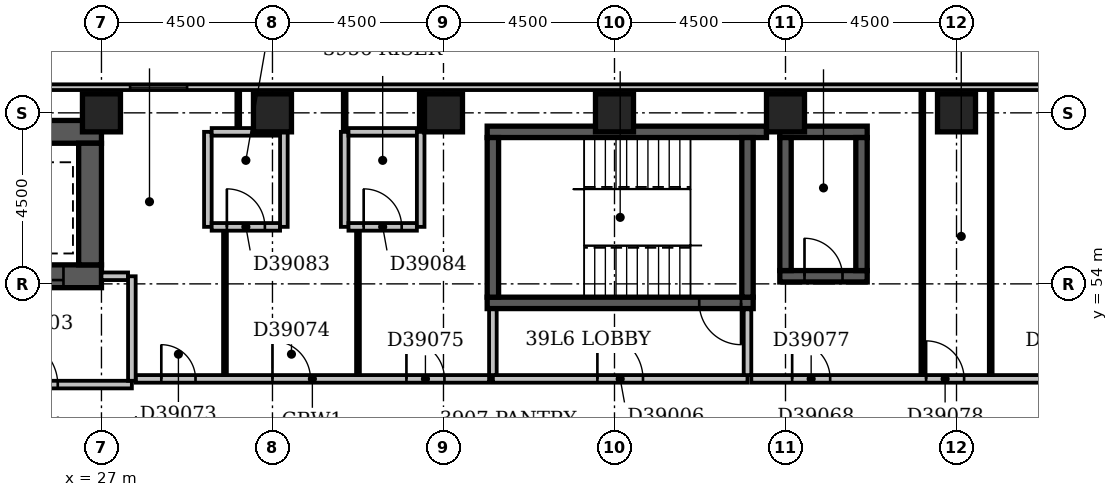
"""IFC4 building model, lengths in metres.
Left out: names, types, materials, properties, quantities, classifications, styles, units other than length and angle.
Written with IfcOpenShell. Run it as: python <this file> out.ifc"""

import sys

from ifc_helpers import new_model, si_unit, direction, frame, frame_2d, origin, origin_2d, place, context, subcontext, project, spatial, rectangle, extrude, element, fill, save


model = new_model("IFC4")
c1 = context("Model", 3, precision=1e-05, world=origin(), true_north=direction((0.0, 1.0)))
c2 = subcontext(c1, "Body", "Model", "MODEL_VIEW")
j1 = project(units=[si_unit("LENGTHUNIT", "METRE"), si_unit("PLANEANGLEUNIT", "RADIAN")], contexts=[c1])
p1 = place(None, origin())
s1 = spatial("IfcSite", under=j1, at=p1, CompositionType="ELEMENT")
p2 = place(p1, origin())
s2 = spatial("IfcBuilding", under=s1, at=p2, CompositionType="ELEMENT")
p3 = place(p2, frame((0.0, 0.0, 155.6)))
s3 = spatial("IfcBuildingStorey", under=s2, at=p3, CompositionType="ELEMENT", Elevation=155.6)
p4 = place(p3, frame((23.9, 54.2, -0.3), z_axis=(0.0, 0.0, 1.0), x_axis=(1.0, 0.0, 0.0)))
e1 = element("IfcWall", 1, at=p4, inside=s3, PredefinedType="SHEAR", context=c2, shape_type="SweptSolid", body=[
    extrude(rectangle(XDim=3.1, YDim=0.6, at=frame_2d((1.55, 0.0))), origin(), (0.0, 0.0, 1.0), 3.6),
])
p5 = place(p4, frame((1.0, 0.0, 0.3)))
e2 = element("IfcOpeningElement", 2, at=p5, cuts=e1, PredefinedType="OPENING", context=c2, shape_type="SweptSolid", body=[
    extrude(rectangle(XDim=1.1, YDim=2.1, at=frame_2d((0.55, 1.05))), frame((0.0, 0.312, 0.0), z_axis=(0.0, -1.0, 0.0), x_axis=(1.0, 0.0, 0.0)), (0.0, 0.0, 1.0), 0.624),
])
p6 = place(p3, frame((23.9, 58.0, -0.3), z_axis=(0.0, 0.0, 1.0), x_axis=(1.0, 0.0, 0.0)))
e3 = element("IfcWall", 3, at=p6, inside=s3, PredefinedType="SHEAR", context=c2, shape_type="SweptSolid", body=[
    extrude(rectangle(XDim=3.1, YDim=0.6, at=frame_2d((1.55, 0.0))), origin(), (0.0, 0.0, 1.0), 3.6),
])
p7 = place(p3, frame((26.7, 54.5, -0.3), z_axis=(0.0, 0.0, 1.0), x_axis=(0.0, 1.0, 0.0)))
e4 = element("IfcWall", 4, at=p7, inside=s3, PredefinedType="SHEAR", context=c2, shape_type="SweptSolid", body=[
    extrude(rectangle(XDim=3.2, YDim=0.6, at=frame_2d((1.6, 0.0))), origin(), (0.0, 0.0, 1.0), 3.6),
])
p8 = place(p3, frame((37.15, 53.5, -0.3), z_axis=(0.0, 0.0, 1.0), x_axis=(1.0, 0.0, 0.0)))
e5 = element("IfcWall", 5, at=p8, inside=s3, PredefinedType="SHEAR", context=c2, shape_type="SweptSolid", body=[
    extrude(rectangle(XDim=7.0, YDim=0.3, at=frame_2d((3.5, 0.0))), origin(), (0.0, 0.0, 1.0), 3.6),
])
p9 = place(p8, frame((5.58, 0.0, 0.3)))
e6 = element("IfcOpeningElement", 6, at=p9, cuts=e5, PredefinedType="OPENING", context=c2, shape_type="SweptSolid", body=[
    extrude(rectangle(XDim=1.1, YDim=2.1, at=frame_2d((0.55, 1.05))), frame((0.0, 0.162, 0.0), z_axis=(0.0, -1.0, 0.0), x_axis=(1.0, 0.0, 0.0)), (0.0, 0.0, 1.0), 0.324),
])
p10 = place(p3, frame((37.15, 58.0, -0.3), z_axis=(0.0, 0.0, 1.0), x_axis=(1.0, 0.0, 0.0)))
e7 = element("IfcWall", 7, at=p10, inside=s3, PredefinedType="SHEAR", context=c2, shape_type="SweptSolid", body=[
    extrude(rectangle(XDim=7.35, YDim=0.3, at=frame_2d((3.675, 0.0))), origin(), (0.0, 0.0, 1.0), 3.6),
])
for number, where, z_axis, x_axis in (
    (8, (37.3, 53.65, -0.3), (0.0, 0.0, 1.0), (0.0, 1.0, 0.0)),
    (9, (44.0, 53.65, -0.3), (0.0, 0.0, 1.0), (0.0, 1.0, 0.0)),
):
    element("IfcWall", number, at=place(p3, frame(where, z_axis=z_axis, x_axis=x_axis)), inside=s3, PredefinedType="SHEAR", context=c2, shape_type="SweptSolid", body=[
        extrude(rectangle(XDim=4.2, YDim=0.3, at=frame_2d((2.1, 0.0))), origin(), (0.0, 0.0, 1.0), 3.6),
    ])
p11 = place(p3, frame((44.85, 54.2, -0.3), z_axis=(0.0, 0.0, 1.0), x_axis=(1.0, 0.0, 0.0)))
e10 = element("IfcWall", 10, at=p11, inside=s3, PredefinedType="SHEAR", context=c2, shape_type="SweptSolid", body=[
    extrude(rectangle(XDim=2.3, YDim=0.3, at=frame_2d((1.15, 0.0))), origin(), (0.0, 0.0, 1.0), 3.6),
])
p12 = place(p11, frame((0.65, 0.0, 0.3)))
e11 = element("IfcOpeningElement", 11, at=p12, cuts=e10, PredefinedType="OPENING", context=c2, shape_type="SweptSolid", body=[
    extrude(rectangle(XDim=1.0, YDim=2.1, at=frame_2d((0.5, 1.05))), frame((0.0, 0.162, 0.0), z_axis=(0.0, -1.0, 0.0), x_axis=(1.0, 0.0, 0.0)), (0.0, 0.0, 1.0), 0.324),
])
p13 = place(p3, frame((44.85, 58.0, -0.3), z_axis=(0.0, 0.0, 1.0), x_axis=(1.0, 0.0, 0.0)))
e12 = element("IfcWall", 12, at=p13, inside=s3, PredefinedType="SHEAR", context=c2, shape_type="SweptSolid", body=[
    extrude(rectangle(XDim=2.3, YDim=0.3, at=frame_2d((1.15, 0.0))), origin(), (0.0, 0.0, 1.0), 3.6),
])
for number, where, z_axis, x_axis in (
    (13, (45.0, 54.35, -0.3), (0.0, 0.0, 1.0), (0.0, 1.0, 0.0)),
    (14, (47.0, 54.35, -0.3), (0.0, 0.0, 1.0), (0.0, 1.0, 0.0)),
):
    element("IfcWall", number, at=place(p3, frame(where, z_axis=z_axis, x_axis=x_axis)), inside=s3, PredefinedType="SHEAR", context=c2, shape_type="SweptSolid", body=[
        extrude(rectangle(XDim=3.5, YDim=0.3, at=frame_2d((1.75, 0.0))), origin(), (0.0, 0.0, 1.0), 3.6),
    ])
for number, where, z_axis, x_axis in (
    (15, (27.0, 58.5, -0.3), (0.0, 0.0, 1.0), (1.0, 0.0, 0.0)),
    (16, (31.5, 58.5, -0.3), (0.0, 0.0, 1.0), (1.0, 0.0, 0.0)),
    (17, (36.0, 58.5, -0.3), (0.0, 0.0, 1.0), (1.0, 0.0, 0.0)),
    (18, (40.5, 58.5, -0.3), (0.0, 0.0, 1.0), (1.0, 0.0, 0.0)),
    (19, (45.0, 58.5, -0.3), (0.0, 0.0, 1.0), (1.0, 0.0, 0.0)),
    (20, (49.5, 58.5, -0.3), (0.0, 0.0, 1.0), (1.0, 0.0, 0.0)),
):
    element("IfcColumn", number, at=place(p3, frame(where, z_axis=z_axis, x_axis=x_axis)), inside=s3, PredefinedType="COLUMN", context=c2, shape_type="SweptSolid", body=[
        extrude(rectangle(XDim=1.0, YDim=1.0, at=origin_2d()), origin(), (0.0, 0.0, 1.0), 3.6),
    ])
p14 = place(p3, frame((68.1, 59.175, 0.0), z_axis=(0.0, 0.0, 1.0), x_axis=(-1.0, 0.0, 0.0)))
e21 = element("IfcWall", 21, at=p14, inside=s3, PredefinedType="STANDARD", context=c2, shape_type="SweptSolid", body=[
    extrude(rectangle(XDim=68.85, YDim=0.15, at=frame_2d((34.425, 0.0))), origin(), (0.0, 0.0, 1.0), 2.7),
])
p15 = place(p14, frame((1.65, 0.0, 0.6)))
e22 = element("IfcOpeningElement", 22, at=p15, cuts=e21, PredefinedType="OPENING", context=c2, shape_type="SweptSolid", body=[
    extrude(rectangle(XDim=2.4, YDim=1.8, at=frame_2d((1.2, 0.9))), frame((0.0, 0.087, 0.0), z_axis=(0.0, -1.0, 0.0), x_axis=(1.0, 0.0, 0.0)), (0.0, 0.0, 1.0), 0.174),
])
p16 = place(p14, frame((6.15, 0.0, 0.6)))
e23 = element("IfcOpeningElement", 23, at=p16, cuts=e21, PredefinedType="OPENING", context=c2, shape_type="SweptSolid", body=[
    extrude(rectangle(XDim=2.4, YDim=1.8, at=frame_2d((1.2, 0.9))), frame((0.0, 0.087, 0.0), z_axis=(0.0, -1.0, 0.0), x_axis=(1.0, 0.0, 0.0)), (0.0, 0.0, 1.0), 0.174),
])
p17 = place(p14, frame((38.847, 0.0, 0.6)))
e24 = element("IfcOpeningElement", 24, at=p17, cuts=e21, PredefinedType="OPENING", context=c2, shape_type="SweptSolid", body=[
    extrude(rectangle(XDim=1.5, YDim=1.8, at=frame_2d((0.75, 0.9))), frame((0.0, 0.087, 0.0), z_axis=(0.0, -1.0, 0.0), x_axis=(1.0, 0.0, 0.0)), (0.0, 0.0, 1.0), 0.174),
])
p18 = place(p3, frame((23.0, 51.35, 0.0), z_axis=(0.0, 0.0, 1.0), x_axis=(1.0, 0.0, 0.0)))
e25 = element("IfcWall", 25, at=p18, inside=s3, PredefinedType="PARTITIONING", context=c2, shape_type="SweptSolid", body=[
    extrude(rectangle(XDim=4.8, YDim=0.2, at=frame_2d((2.4, 0.0))), origin(), (0.0, 0.0, 1.0), 3.3),
])
p19 = place(p18, frame((1.65, 0.0, 0.0)))
e26 = element("IfcOpeningElement", 26, at=p19, cuts=e25, PredefinedType="OPENING", context=c2, shape_type="SweptSolid", body=[
    extrude(rectangle(XDim=1.2, YDim=2.1, at=frame_2d((0.6, 1.05))), frame((0.0, 0.112, 0.0), z_axis=(0.0, -1.0, 0.0), x_axis=(1.0, 0.0, 0.0)), (0.0, 0.0, 1.0), 0.224),
])
p20 = place(p3, frame((27.8, 51.45, 0.0), z_axis=(0.0, 0.0, 1.0), x_axis=(0.0, 1.0, 0.0)))
e27 = element("IfcWall", 27, at=p20, inside=s3, PredefinedType="PARTITIONING", context=c2, shape_type="SweptSolid", body=[
    extrude(rectangle(XDim=2.75, YDim=0.2, at=frame_2d((1.375, 0.0))), origin(), (0.0, 0.0, 1.0), 3.3),
])
p21 = place(p3, frame((27.0, 54.2, 0.0), z_axis=(0.0, 0.0, 1.0), x_axis=(1.0, 0.0, 0.0)))
e28 = element("IfcWall", 28, at=p21, inside=s3, PredefinedType="PARTITIONING", context=c2, shape_type="SweptSolid", body=[
    extrude(rectangle(XDim=0.7, YDim=0.2, at=frame_2d((0.35, 0.0))), origin(), (0.0, 0.0, 1.0), 3.3),
])
p22 = place(p3, frame((37.3, 51.5, 0.0), z_axis=(0.0, 0.0, 1.0), x_axis=(1.0, 0.0, 0.0)))
e29 = element("IfcWall", 29, at=p22, inside=s3, PredefinedType="PARTITIONING", context=c2, shape_type="SweptSolid", body=[
    extrude(rectangle(XDim=6.7, YDim=0.2, at=frame_2d((3.35, 0.0))), origin(), (0.0, 0.0, 1.0), 3.3),
])
p23 = place(p22, frame((2.75, 0.0, 0.0)))
e30 = element("IfcOpeningElement", 30, at=p23, cuts=e29, PredefinedType="OPENING", context=c2, shape_type="SweptSolid", body=[
    extrude(rectangle(XDim=1.2, YDim=2.1, at=frame_2d((0.6, 1.05))), frame((0.0, 0.112, 0.0), z_axis=(0.0, -1.0, 0.0), x_axis=(1.0, 0.0, 0.0)), (0.0, 0.0, 1.0), 0.224),
])
for number, where, z_axis, x_axis in (
    (31, (44.0, 51.6, 0.0), (0.0, 0.0, 1.0), (0.0, 1.0, 0.0)),
    (32, (37.3, 51.6, 0.0), (0.0, 0.0, 1.0), (0.0, 1.0, 0.0)),
):
    element("IfcWall", number, at=place(p3, frame(where, z_axis=z_axis, x_axis=x_axis)), inside=s3, PredefinedType="PARTITIONING", context=c2, shape_type="SweptSolid", body=[
        extrude(rectangle(XDim=1.73, YDim=0.2, at=frame_2d((0.865, 0.0))), origin(), (0.0, 0.0, 1.0), 3.3),
    ])
p24 = place(p3, frame((27.9, 51.5, 0.0), z_axis=(0.0, 0.0, 1.0), x_axis=(1.0, 0.0, 0.0)))
e33 = element("IfcWall", 33, at=p24, inside=s3, PredefinedType="PARTITIONING", context=c2, shape_type="SweptSolid", body=[
    extrude(rectangle(XDim=9.3, YDim=0.2, at=frame_2d((4.65, 0.0))), origin(), (0.0, 0.0, 1.0), 3.3),
])
p25 = place(p24, frame((0.675, 0.0, 0.0)))
e34 = element("IfcOpeningElement", 34, at=p25, cuts=e33, PredefinedType="OPENING", context=c2, shape_type="SweptSolid", body=[
    extrude(rectangle(XDim=0.9, YDim=2.1, at=frame_2d((0.45, 1.05))), frame((0.0, 0.112, 0.0), z_axis=(0.0, -1.0, 0.0), x_axis=(1.0, 0.0, 0.0)), (0.0, 0.0, 1.0), 0.224),
])
p26 = place(p24, frame((3.6, 0.0, 0.0)))
e35 = element("IfcOpeningElement", 35, at=p26, cuts=e33, PredefinedType="OPENING", context=c2, shape_type="SweptSolid", body=[
    extrude(rectangle(XDim=1.0, YDim=2.1, at=frame_2d((0.5, 1.05))), frame((0.0, 0.112, 0.0), z_axis=(0.0, -1.0, 0.0), x_axis=(1.0, 0.0, 0.0)), (0.0, 0.0, 1.0), 0.224),
])
p27 = place(p24, frame((7.125, 0.0, 0.0)))
e36 = element("IfcOpeningElement", 36, at=p27, cuts=e33, PredefinedType="OPENING", context=c2, shape_type="SweptSolid", body=[
    extrude(rectangle(XDim=1.0, YDim=2.1, at=frame_2d((0.5, 1.05))), frame((0.0, 0.112, 0.0), z_axis=(0.0, -1.0, 0.0), x_axis=(1.0, 0.0, 0.0)), (0.0, 0.0, 1.0), 0.224),
])
p28 = place(p3, frame((44.1, 51.5, 0.0), z_axis=(0.0, 0.0, 1.0), x_axis=(1.0, 0.0, 0.0)))
e37 = element("IfcWall", 37, at=p28, inside=s3, PredefinedType="PARTITIONING", context=c2, shape_type="SweptSolid", body=[
    extrude(rectangle(XDim=9.8, YDim=0.2, at=frame_2d((4.9, 0.0))), origin(), (0.0, 0.0, 1.0), 3.3),
])
p29 = place(p28, frame((7.725, 0.0, 0.0)))
e38 = element("IfcOpeningElement", 38, at=p29, cuts=e37, PredefinedType="OPENING", context=c2, shape_type="SweptSolid", body=[
    extrude(rectangle(XDim=1.0, YDim=2.1, at=frame_2d((0.5, 1.05))), frame((0.0, 0.112, 0.0), z_axis=(0.0, -1.0, 0.0), x_axis=(1.0, 0.0, 0.0)), (0.0, 0.0, 1.0), 0.224),
])
p30 = place(p28, frame((1.075, 0.0, 0.0)))
e39 = element("IfcOpeningElement", 39, at=p30, cuts=e37, PredefinedType="OPENING", context=c2, shape_type="SweptSolid", body=[
    extrude(rectangle(XDim=1.0, YDim=2.1, at=frame_2d((0.5, 1.05))), frame((0.0, 0.112, 0.0), z_axis=(0.0, -1.0, 0.0), x_axis=(1.0, 0.0, 0.0)), (0.0, 0.0, 1.0), 0.224),
])
p31 = place(p28, frame((4.6, 0.0, 0.0)))
e40 = element("IfcOpeningElement", 40, at=p31, cuts=e37, PredefinedType="OPENING", context=c2, shape_type="SweptSolid", body=[
    extrude(rectangle(XDim=1.0, YDim=2.1, at=frame_2d((0.5, 1.05))), frame((0.0, 0.112, 0.0), z_axis=(0.0, -1.0, 0.0), x_axis=(1.0, 0.0, 0.0)), (0.0, 0.0, 1.0), 0.224),
])
for number, where, z_axis, x_axis in (
    (41, (30.25, 51.6, 0.0), (0.0, 0.0, 1.0), (0.0, 1.0, 0.0)),
    (42, (33.75, 51.6, 0.0), (0.0, 0.0, 1.0), (0.0, 1.0, 0.0)),
):
    element("IfcWall", number, at=place(p3, frame(where, z_axis=z_axis, x_axis=x_axis)), inside=s3, PredefinedType="PARTITIONING", context=c2, shape_type="SweptSolid", body=[
        extrude(rectangle(XDim=3.8, YDim=0.1, at=frame_2d((1.9, 0.0))), origin(), (0.0, 0.0, 1.0), 3.3),
    ])
for number, where, z_axis, x_axis in (
    (43, (48.6, 51.6, 0.0), (0.0, 0.0, 1.0), (0.0, 1.0, 0.0)),
    (44, (50.4, 51.6, 0.0), (0.0, 0.0, 1.0), (0.0, 1.0, 0.0)),
):
    element("IfcWall", number, at=place(p3, frame(where, z_axis=z_axis, x_axis=x_axis)), inside=s3, PredefinedType="PARTITIONING", context=c2, shape_type="SweptSolid", body=[
        extrude(rectangle(XDim=7.5, YDim=0.1, at=frame_2d((3.75, 0.0))), origin(), (0.0, 0.0, 1.0), 3.3),
    ])
p32 = place(p3, frame((29.8, 55.5, 0.0), z_axis=(0.0, 0.0, 1.0), x_axis=(0.0, 1.0, 0.0)))
e45 = element("IfcWall", 45, at=p32, inside=s3, PredefinedType="PARTITIONING", context=c2, shape_type="SweptSolid", body=[
    extrude(rectangle(XDim=2.5, YDim=0.2, at=frame_2d((1.25, 0.0))), origin(), (0.0, 0.0, 1.0), 3.3),
])
p33 = place(p3, frame((29.9, 55.5, 0.0), z_axis=(0.0, 0.0, 1.0), x_axis=(1.0, 0.0, 0.0)))
e46 = element("IfcWall", 46, at=p33, inside=s3, PredefinedType="PARTITIONING", context=c2, shape_type="SweptSolid", body=[
    extrude(rectangle(XDim=1.8, YDim=0.2, at=frame_2d((0.9, 0.0))), origin(), (0.0, 0.0, 1.0), 3.3),
])
p34 = place(p33, frame((0.4, 0.0, 0.0)))
e47 = element("IfcOpeningElement", 47, at=p34, cuts=e46, PredefinedType="OPENING", context=c2, shape_type="SweptSolid", body=[
    extrude(rectangle(XDim=1.0, YDim=2.1, at=frame_2d((0.5, 1.05))), frame((0.0, 0.112, 0.0), z_axis=(0.0, -1.0, 0.0), x_axis=(1.0, 0.0, 0.0)), (0.0, 0.0, 1.0), 0.224),
])
for number, where, z_axis, x_axis in (
    (48, (31.8, 55.5, 0.0), (0.0, 0.0, 1.0), (0.0, 1.0, 0.0)),
    (49, (33.4, 55.5, 0.0), (0.0, 0.0, 1.0), (0.0, 1.0, 0.0)),
):
    element("IfcWall", number, at=place(p3, frame(where, z_axis=z_axis, x_axis=x_axis)), inside=s3, PredefinedType="PARTITIONING", context=c2, shape_type="SweptSolid", body=[
        extrude(rectangle(XDim=2.5, YDim=0.2, at=frame_2d((1.25, 0.0))), origin(), (0.0, 0.0, 1.0), 3.3),
    ])
p35 = place(p3, frame((33.5, 55.5, 0.0), z_axis=(0.0, 0.0, 1.0), x_axis=(1.0, 0.0, 0.0)))
e50 = element("IfcWall", 50, at=p35, inside=s3, PredefinedType="PARTITIONING", context=c2, shape_type="SweptSolid", body=[
    extrude(rectangle(XDim=1.8, YDim=0.2, at=frame_2d((0.9, 0.0))), origin(), (0.0, 0.0, 1.0), 3.3),
])
p36 = place(p35, frame((0.4, 0.0, 0.0)))
e51 = element("IfcOpeningElement", 51, at=p36, cuts=e50, PredefinedType="OPENING", context=c2, shape_type="SweptSolid", body=[
    extrude(rectangle(XDim=1.0, YDim=2.1, at=frame_2d((0.5, 1.05))), frame((0.0, 0.112, 0.0), z_axis=(0.0, -1.0, 0.0), x_axis=(1.0, 0.0, 0.0)), (0.0, 0.0, 1.0), 0.224),
])
p37 = place(p3, frame((35.4, 55.5, 0.0), z_axis=(0.0, 0.0, 1.0), x_axis=(0.0, 1.0, 0.0)))
e52 = element("IfcWall", 52, at=p37, inside=s3, PredefinedType="PARTITIONING", context=c2, shape_type="SweptSolid", body=[
    extrude(rectangle(XDim=2.5, YDim=0.2, at=frame_2d((1.25, 0.0))), origin(), (0.0, 0.0, 1.0), 2.4),
])
p38 = place(p3, frame((29.9, 58.0, 0.0), z_axis=(0.0, 0.0, 1.0), x_axis=(1.0, 0.0, 0.0)))
e53 = element("IfcWall", 53, at=p38, inside=s3, PredefinedType="PARTITIONING", context=c2, shape_type="SweptSolid", body=[
    extrude(rectangle(XDim=1.8, YDim=0.2, at=frame_2d((0.9, 0.0))), origin(), (0.0, 0.0, 1.0), 3.3),
])
p39 = place(p3, frame((33.4, 58.0, 0.0), z_axis=(0.0, 0.0, 1.0), x_axis=(0.0, 1.0, 0.0)))
e54 = element("IfcWall", 54, at=p39, inside=s3, PredefinedType="PARTITIONING", context=c2, shape_type="SweptSolid", body=[
    extrude(rectangle(XDim=1.1, YDim=0.1, at=frame_2d((0.55, 0.0))), origin(), (0.0, 0.0, 1.0), 3.3),
])
p40 = place(p3, frame((33.5, 58.0, 0.0), z_axis=(0.0, 0.0, 1.0), x_axis=(1.0, 0.0, 0.0)))
e55 = element("IfcWall", 55, at=p40, inside=s3, PredefinedType="PARTITIONING", context=c2, shape_type="SweptSolid", body=[
    extrude(rectangle(XDim=1.8, YDim=0.2, at=frame_2d((0.9, 0.0))), origin(), (0.0, 0.0, 1.0), 3.3),
])
p41 = place(p3, frame((35.4, 58.0, 0.0), z_axis=(0.0, 0.0, 1.0), x_axis=(0.0, 1.0, 0.0)))
e56 = element("IfcWall", 56, at=p41, inside=s3, PredefinedType="PARTITIONING", context=c2, shape_type="SweptSolid", body=[
    extrude(rectangle(XDim=1.1, YDim=0.1, at=frame_2d((0.55, 0.0))), origin(), (0.0, 0.0, 1.0), 2.4),
])
p42 = place(p3, frame((30.6, 58.1, 0.0), z_axis=(0.0, 0.0, 1.0), x_axis=(0.0, 1.0, 0.0)))
e57 = element("IfcWall", 57, at=p42, inside=s3, PredefinedType="PARTITIONING", context=c2, shape_type="SweptSolid", body=[
    extrude(rectangle(XDim=1.0, YDim=0.1, at=frame_2d((0.5, 0.0))), origin(), (0.0, 0.0, 1.0), 3.3),
])
p43 = place(p17, origin())
e58 = element("IfcWindow", 58, at=p43, inside=s3, PartitioningType="SINGLE_PANEL", PredefinedType="WINDOW", context=c2, shape_type="SweptSolid", body=[
    extrude(rectangle(XDim=1.5, YDim=1.8, at=frame_2d((0.75, 0.9))), frame((0.0, 0.03, 0.0), z_axis=(0.0, -1.0, 0.0), x_axis=(1.0, 0.0, 0.0)), (0.0, 0.0, 1.0), 0.06),
])
fill(e24, e58)
p44 = place(p19, origin())
e59 = element("IfcDoor", 59, at=p44, inside=s3, OperationType="SINGLE_SWING_LEFT", PredefinedType="DOOR", context=c2, shape_type="SweptSolid", body=[
    extrude(rectangle(XDim=1.2, YDim=2.1, at=frame_2d((0.6, 1.05))), frame((0.0, 0.025, 0.0), z_axis=(0.0, -1.0, 0.0), x_axis=(1.0, 0.0, 0.0)), (0.0, 0.0, 1.0), 0.05),
])
fill(e26, e59)
p45 = place(p5, origin())
e60 = element("IfcDoor", 60, at=p45, inside=s3, OperationType="SLIDING_TO_LEFT", PredefinedType="DOOR", context=c2, shape_type="SweptSolid", body=[
    extrude(rectangle(XDim=1.1, YDim=2.1, at=frame_2d((0.55, 1.05))), frame((0.0, 0.025, 0.0), z_axis=(0.0, -1.0, 0.0), x_axis=(1.0, 0.0, 0.0)), (0.0, 0.0, 1.0), 0.05),
])
fill(e2, e60)
p46 = place(p23, origin())
e61 = element("IfcDoor", 61, at=p46, inside=s3, OperationType="SINGLE_SWING_LEFT", PredefinedType="DOOR", context=c2, shape_type="SweptSolid", body=[
    extrude(rectangle(XDim=1.2, YDim=2.1, at=frame_2d((0.6, 1.05))), frame((0.0, 0.025, 0.0), z_axis=(0.0, -1.0, 0.0), x_axis=(1.0, 0.0, 0.0)), (0.0, 0.0, 1.0), 0.05),
])
fill(e30, e61)
p47 = place(p12, origin())
e62 = element("IfcDoor", 62, at=p47, inside=s3, OperationType="SINGLE_SWING_LEFT", PredefinedType="DOOR", context=c2, shape_type="SweptSolid", body=[
    extrude(rectangle(XDim=1.0, YDim=2.1, at=frame_2d((0.5, 1.05))), frame((0.0, 0.025, 0.0), z_axis=(0.0, -1.0, 0.0), x_axis=(1.0, 0.0, 0.0)), (0.0, 0.0, 1.0), 0.05),
])
fill(e11, e62)
p48 = place(p9, origin())
e63 = element("IfcDoor", 63, at=p48, inside=s3, OperationType="SINGLE_SWING_RIGHT", PredefinedType="DOOR", context=c2, shape_type="SweptSolid", body=[
    extrude(rectangle(XDim=1.1, YDim=2.1, at=frame_2d((0.55, 1.05))), frame((0.0, 0.025, 0.0), z_axis=(0.0, -1.0, 0.0), x_axis=(1.0, 0.0, 0.0)), (0.0, 0.0, 1.0), 0.05),
])
fill(e6, e63)
p49 = place(p25, origin())
e64 = element("IfcDoor", 64, at=p49, inside=s3, OperationType="SINGLE_SWING_LEFT", PredefinedType="DOOR", context=c2, shape_type="SweptSolid", body=[
    extrude(rectangle(XDim=0.9, YDim=2.1, at=frame_2d((0.45, 1.05))), frame((0.0, 0.025, 0.0), z_axis=(0.0, -1.0, 0.0), x_axis=(1.0, 0.0, 0.0)), (0.0, 0.0, 1.0), 0.05),
])
fill(e34, e64)
p50 = place(p26, origin())
e65 = element("IfcDoor", 65, at=p50, inside=s3, OperationType="SINGLE_SWING_LEFT", PredefinedType="DOOR", context=c2, shape_type="SweptSolid", body=[
    extrude(rectangle(XDim=1.0, YDim=2.1, at=frame_2d((0.5, 1.05))), frame((0.0, 0.025, 0.0), z_axis=(0.0, -1.0, 0.0), x_axis=(1.0, 0.0, 0.0)), (0.0, 0.0, 1.0), 0.05),
])
fill(e35, e65)
p51 = place(p27, origin())
e66 = element("IfcDoor", 66, at=p51, inside=s3, OperationType="SINGLE_SWING_LEFT", PredefinedType="DOOR", context=c2, shape_type="SweptSolid", body=[
    extrude(rectangle(XDim=1.0, YDim=2.1, at=frame_2d((0.5, 1.05))), frame((0.0, 0.025, 0.0), z_axis=(0.0, -1.0, 0.0), x_axis=(1.0, 0.0, 0.0)), (0.0, 0.0, 1.0), 0.05),
])
fill(e36, e66)
p52 = place(p30, origin())
e67 = element("IfcDoor", 67, at=p52, inside=s3, OperationType="SINGLE_SWING_LEFT", PredefinedType="DOOR", context=c2, shape_type="SweptSolid", body=[
    extrude(rectangle(XDim=1.0, YDim=2.1, at=frame_2d((0.5, 1.05))), frame((0.0, 0.025, 0.0), z_axis=(0.0, -1.0, 0.0), x_axis=(1.0, 0.0, 0.0)), (0.0, 0.0, 1.0), 0.05),
])
fill(e39, e67)
p53 = place(p31, origin())
e68 = element("IfcDoor", 68, at=p53, inside=s3, OperationType="SINGLE_SWING_LEFT", PredefinedType="DOOR", context=c2, shape_type="SweptSolid", body=[
    extrude(rectangle(XDim=1.0, YDim=2.1, at=frame_2d((0.5, 1.05))), frame((0.0, 0.025, 0.0), z_axis=(0.0, -1.0, 0.0), x_axis=(1.0, 0.0, 0.0)), (0.0, 0.0, 1.0), 0.05),
])
fill(e40, e68)
p54 = place(p34, origin())
e69 = element("IfcDoor", 69, at=p54, inside=s3, OperationType="SINGLE_SWING_LEFT", PredefinedType="DOOR", context=c2, shape_type="SweptSolid", body=[
    extrude(rectangle(XDim=1.0, YDim=2.1, at=frame_2d((0.5, 1.05))), frame((0.0, 0.025, 0.0), z_axis=(0.0, -1.0, 0.0), x_axis=(1.0, 0.0, 0.0)), (0.0, 0.0, 1.0), 0.05),
])
fill(e47, e69)
p55 = place(p36, origin())
e70 = element("IfcDoor", 70, at=p55, inside=s3, OperationType="SINGLE_SWING_LEFT", PredefinedType="DOOR", context=c2, shape_type="SweptSolid", body=[
    extrude(rectangle(XDim=1.0, YDim=2.1, at=frame_2d((0.5, 1.05))), frame((0.0, 0.025, 0.0), z_axis=(0.0, -1.0, 0.0), x_axis=(1.0, 0.0, 0.0)), (0.0, 0.0, 1.0), 0.05),
])
fill(e51, e70)
save(model, sys.argv[1])
